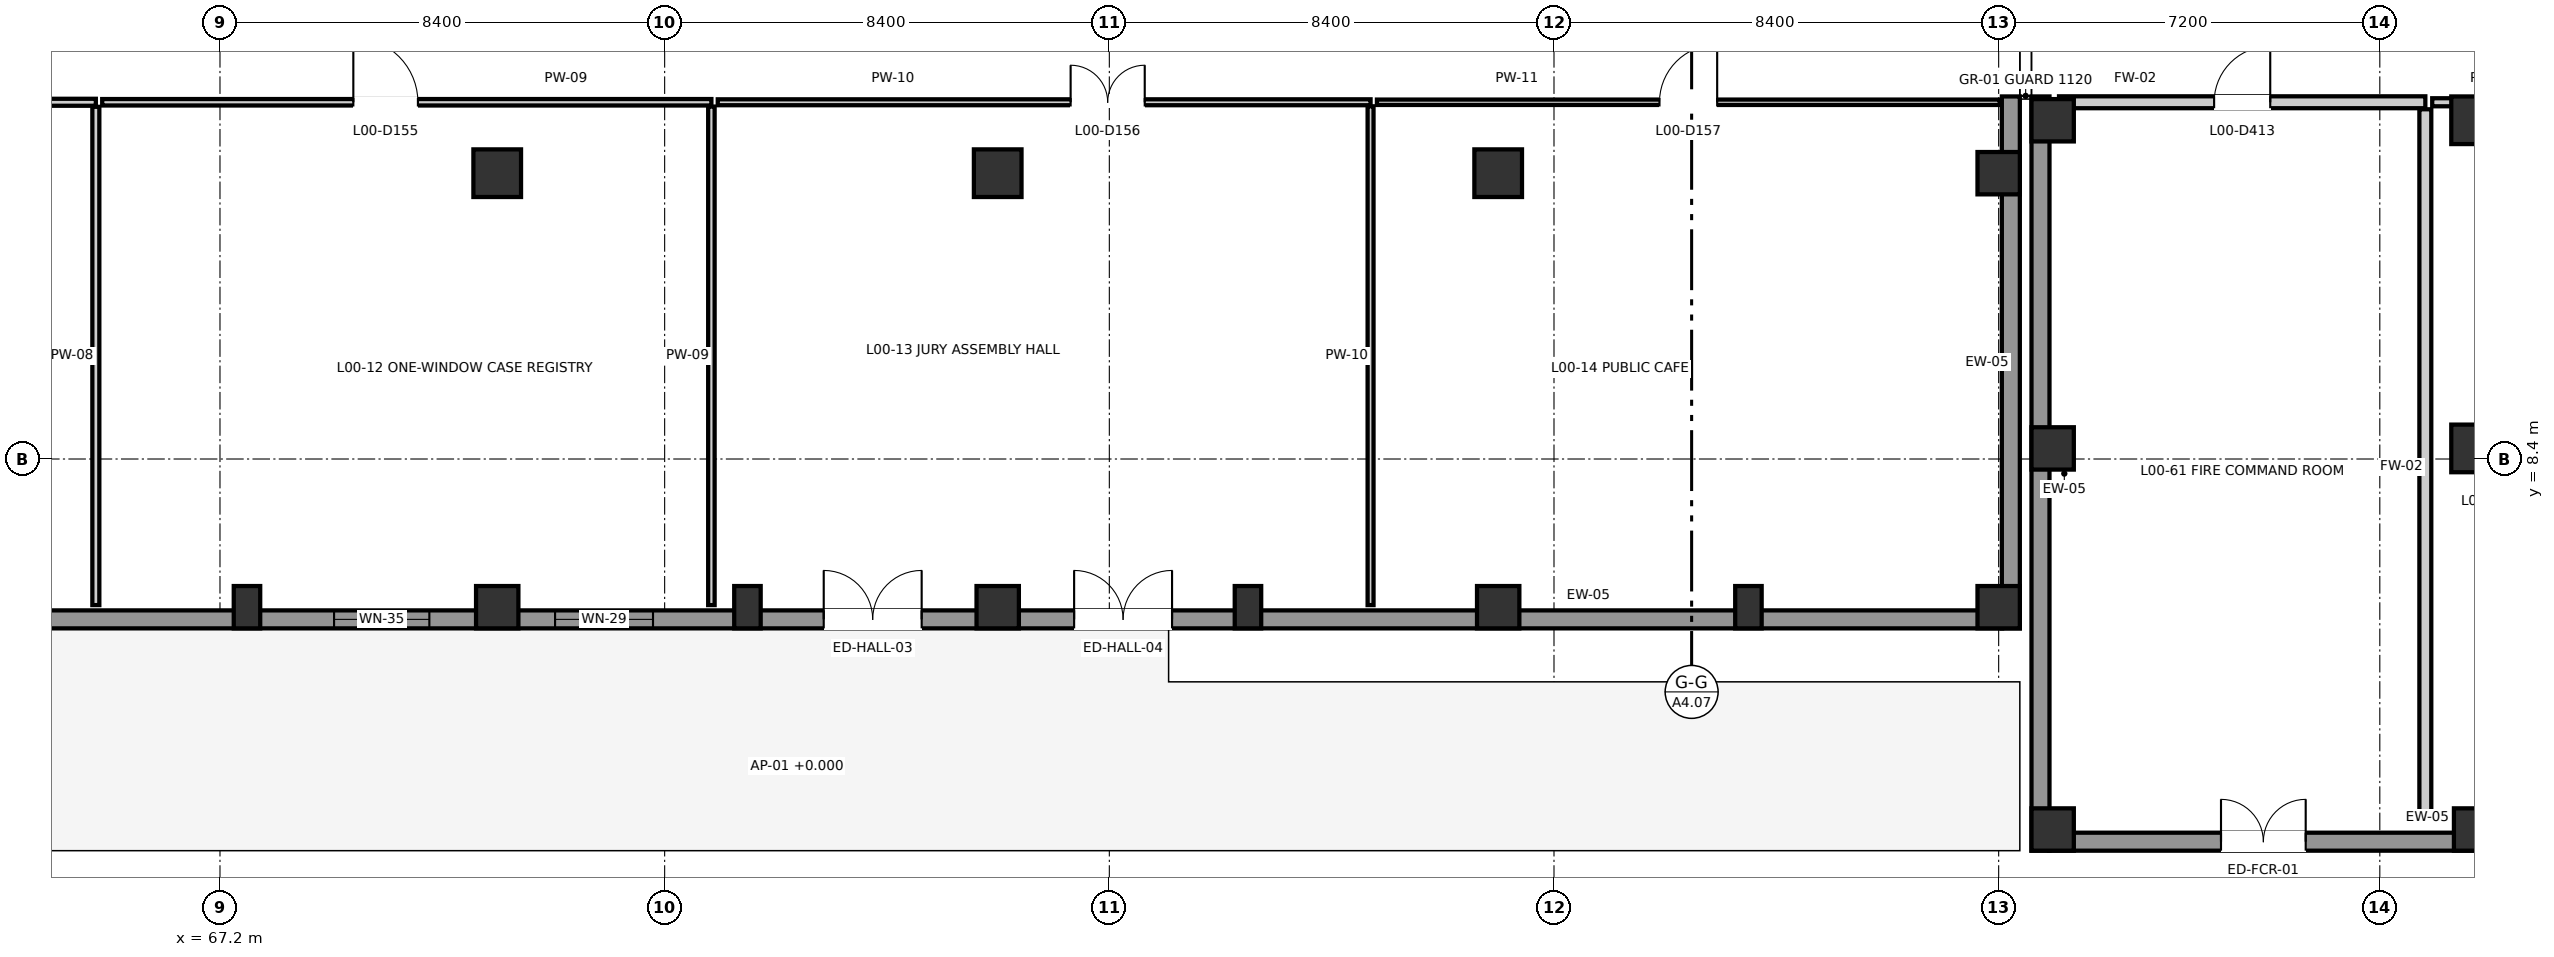
"""IFC4 building model, lengths in metres.
Left out: names, types, materials, properties, quantities, classifications, styles, units other than length and angle.
Written with IfcOpenShell. Run it as: python <this file> out.ifc"""

import sys

from ifc_helpers import new_model, si_unit, direction, frame, frame_2d, origin, origin_2d, place, context, subcontext, project, spatial, rectangle, extrude, element, fill, save


model = new_model("IFC4")
c1 = context("Model", 3, precision=1e-05, world=origin(), true_north=direction((0.0, 1.0)))
c2 = subcontext(c1, "Body", "Model", "MODEL_VIEW")
j1 = project(units=[si_unit("LENGTHUNIT", "METRE"), si_unit("PLANEANGLEUNIT", "RADIAN")], contexts=[c1])
p1 = place(None, origin())
s1 = spatial("IfcSite", under=j1, at=p1, CompositionType="ELEMENT")
p2 = place(p1, origin())
s2 = spatial("IfcBuilding", under=s1, at=p2, CompositionType="ELEMENT")
p3 = place(p2, origin())
s3 = spatial("IfcBuildingStorey", under=s2, at=p3, CompositionType="ELEMENT", Elevation=0.0)
p4 = place(p3, frame((72.437, 5.6, 0.0), z_axis=(0.0, 0.0, 1.0), x_axis=(1.0, 0.0, 0.0)))
e1 = element("IfcColumn", 1, at=p4, inside=s3, PredefinedType="COLUMN", context=c2, shape_type="SweptSolid", body=[
    extrude(rectangle(XDim=0.8, YDim=0.8, at=origin_2d()), origin(), (0.0, 0.0, 1.0), 5.4),
])
p5 = place(p3, frame((72.437, 13.8, 0.0), z_axis=(0.0, 0.0, 1.0), x_axis=(1.0, 0.0, 0.0)))
e2 = element("IfcColumn", 2, at=p5, inside=s3, PredefinedType="COLUMN", context=c2, shape_type="SweptSolid", body=[
    extrude(rectangle(XDim=0.9, YDim=0.9, at=origin_2d()), origin(), (0.0, 0.0, 1.0), 5.4),
])
p6 = place(p3, frame((81.891, 5.6, 0.0), z_axis=(0.0, 0.0, 1.0), x_axis=(1.0, 0.0, 0.0)))
e3 = element("IfcColumn", 3, at=p6, inside=s3, PredefinedType="COLUMN", context=c2, shape_type="SweptSolid", body=[
    extrude(rectangle(XDim=0.8, YDim=0.8, at=origin_2d()), origin(), (0.0, 0.0, 1.0), 5.4),
])
p7 = place(p3, frame((81.891, 13.8, 0.0), z_axis=(0.0, 0.0, 1.0), x_axis=(1.0, 0.0, 0.0)))
e4 = element("IfcColumn", 4, at=p7, inside=s3, PredefinedType="COLUMN", context=c2, shape_type="SweptSolid", body=[
    extrude(rectangle(XDim=0.9, YDim=0.9, at=origin_2d()), origin(), (0.0, 0.0, 1.0), 5.4),
])
p8 = place(p3, frame((91.346, 5.6, 0.0), z_axis=(0.0, 0.0, 1.0), x_axis=(1.0, 0.0, 0.0)))
e5 = element("IfcColumn", 5, at=p8, inside=s3, PredefinedType="COLUMN", context=c2, shape_type="SweptSolid", body=[
    extrude(rectangle(XDim=0.8, YDim=0.8, at=origin_2d()), origin(), (0.0, 0.0, 1.0), 5.4),
])
p9 = place(p3, frame((91.346, 13.8, 0.0), z_axis=(0.0, 0.0, 1.0), x_axis=(1.0, 0.0, 0.0)))
e6 = element("IfcColumn", 6, at=p9, inside=s3, PredefinedType="COLUMN", context=c2, shape_type="SweptSolid", body=[
    extrude(rectangle(XDim=0.9, YDim=0.9, at=origin_2d()), origin(), (0.0, 0.0, 1.0), 5.4),
])
for number, where, z_axis, x_axis in (
    (7, (100.8, 5.6, 0.0), (0.0, 0.0, 1.0), (1.0, 0.0, 0.0)),
    (8, (100.8, 13.8, 0.0), (0.0, 0.0, 1.0), (1.0, 0.0, 0.0)),
    (9, (101.82, 1.4, 0.0), (0.0, 0.0, 1.0), (1.0, 0.0, 0.0)),
    (10, (101.82, 8.6, 0.0), (0.0, 0.0, 1.0), (1.0, 0.0, 0.0)),
    (11, (101.82, 14.8, 0.0), (0.0, 0.0, 1.0), (1.0, 0.0, 0.0)),
    (12, (109.8, 1.4, 0.0), (0.0, 0.0, 1.0), (1.0, 0.0, 0.0)),
):
    element("IfcColumn", number, at=place(p3, frame(where, z_axis=z_axis, x_axis=x_axis)), inside=s3, PredefinedType="COLUMN", context=c2, shape_type="SweptSolid", body=[
        extrude(rectangle(XDim=0.8, YDim=0.8, at=origin_2d()), origin(), (0.0, 0.0, 1.0), 5.4),
    ])
for number, where, z_axis, x_axis in (
    (13, (109.8, 8.6, 0.0), (0.0, 0.0, 1.0), (1.0, 0.0, 0.0)),
    (14, (109.8, 14.8, 0.0), (0.0, 0.0, 1.0), (1.0, 0.0, 0.0)),
):
    element("IfcColumn", number, at=place(p3, frame(where, z_axis=z_axis, x_axis=x_axis)), inside=s3, PredefinedType="COLUMN", context=c2, shape_type="SweptSolid", body=[
        extrude(rectangle(XDim=0.9, YDim=0.9, at=origin_2d()), origin(), (0.0, 0.0, 1.0), 5.4),
    ])
for number, where, z_axis, x_axis in (
    (15, (67.71, 5.6, 0.0), (0.0, 0.0, 1.0), (1.0, 0.0, 0.0)),
    (16, (77.164, 5.6, 0.0), (0.0, 0.0, 1.0), (1.0, 0.0, 0.0)),
    (17, (86.619, 5.6, 0.0), (0.0, 0.0, 1.0), (1.0, 0.0, 0.0)),
    (18, (96.073, 5.6, 0.0), (0.0, 0.0, 1.0), (1.0, 0.0, 0.0)),
):
    element("IfcColumn", number, at=place(p3, frame(where, z_axis=z_axis, x_axis=x_axis)), inside=s3, PredefinedType="PILASTER", context=c2, shape_type="SweptSolid", body=[
        extrude(rectangle(XDim=0.5, YDim=0.8, at=origin_2d()), origin(), (0.0, 0.0, 1.0), 5.4),
    ])
p10 = place(p3, frame((34.555, 5.37, 0.0), z_axis=(0.0, 0.0, 1.0), x_axis=(1.0, 0.0, 0.0)))
e19 = element("IfcWall", 19, at=p10, inside=s3, PredefinedType="SOLIDWALL", context=c2, shape_type="SweptSolid", body=[
    extrude(rectangle(XDim=66.31, YDim=0.34, at=frame_2d((33.155, 0.0))), origin(), (0.0, 0.0, 1.0), 5.1),
])
p11 = place(p10, frame((15.68, 0.0, 0.0)))
e20 = element("IfcOpeningElement", 20, at=p11, cuts=e19, PredefinedType="OPENING", context=c2, shape_type="SweptSolid", body=[
    extrude(rectangle(XDim=1.85, YDim=2.45, at=frame_2d((0.925, 1.225))), frame((0.0, 0.185, 0.0), z_axis=(0.0, -1.0, 0.0), x_axis=(1.0, 0.0, 0.0)), (0.0, 0.0, 1.0), 0.37),
])
p12 = place(p10, frame((20.41, 0.0, 0.0)))
e21 = element("IfcOpeningElement", 21, at=p12, cuts=e19, PredefinedType="OPENING", context=c2, shape_type="SweptSolid", body=[
    extrude(rectangle(XDim=1.85, YDim=2.45, at=frame_2d((0.925, 1.225))), frame((0.0, 0.185, 0.0), z_axis=(0.0, -1.0, 0.0), x_axis=(1.0, 0.0, 0.0)), (0.0, 0.0, 1.0), 0.37),
])
p13 = place(p10, frame((44.05, 0.0, 0.0)))
e22 = element("IfcOpeningElement", 22, at=p13, cuts=e19, PredefinedType="OPENING", context=c2, shape_type="SweptSolid", body=[
    extrude(rectangle(XDim=1.85, YDim=2.45, at=frame_2d((0.925, 1.225))), frame((0.0, 0.185, 0.0), z_axis=(0.0, -1.0, 0.0), x_axis=(1.0, 0.0, 0.0)), (0.0, 0.0, 1.0), 0.37),
])
p14 = place(p10, frame((48.78, 0.0, 0.0)))
e23 = element("IfcOpeningElement", 23, at=p14, cuts=e19, PredefinedType="OPENING", context=c2, shape_type="SweptSolid", body=[
    extrude(rectangle(XDim=1.85, YDim=2.45, at=frame_2d((0.925, 1.225))), frame((0.0, 0.185, 0.0), z_axis=(0.0, -1.0, 0.0), x_axis=(1.0, 0.0, 0.0)), (0.0, 0.0, 1.0), 0.37),
])
p15 = place(p10, frame((34.8, 0.0, 0.72)))
e24 = element("IfcOpeningElement", 24, at=p15, cuts=e19, PredefinedType="OPENING", context=c2, shape_type="SweptSolid", body=[
    extrude(rectangle(XDim=1.8, YDim=2.35, at=frame_2d((0.9, 1.175))), frame((0.0, 0.185, 0.0), z_axis=(0.0, -1.0, 0.0), x_axis=(1.0, 0.0, 0.0)), (0.0, 0.0, 1.0), 0.37),
])
p16 = place(p10, frame((38.975, 0.0, 0.72)))
e25 = element("IfcOpeningElement", 25, at=p16, cuts=e19, PredefinedType="OPENING", context=c2, shape_type="SweptSolid", body=[
    extrude(rectangle(XDim=1.85, YDim=2.15, at=frame_2d((0.925, 1.075))), frame((0.0, 0.185, 0.0), z_axis=(0.0, -1.0, 0.0), x_axis=(1.0, 0.0, 0.0)), (0.0, 0.0, 1.0), 0.37),
])
p17 = place(p3, frame((101.03, 5.2, 0.0), z_axis=(0.0, 0.0, 1.0), x_axis=(0.0, 1.0, 0.0)))
e26 = element("IfcWall", 26, at=p17, inside=s3, PredefinedType="SOLIDWALL", context=c2, shape_type="SweptSolid", body=[
    extrude(rectangle(XDim=10.05, YDim=0.34, at=frame_2d((5.025, 0.0))), origin(), (0.0, 0.0, 1.0), 5.1),
])
p18 = place(p3, frame((101.755, 1.17, 0.0), z_axis=(0.0, 0.0, 1.0), x_axis=(1.0, 0.0, 0.0)))
e27 = element("IfcWall", 27, at=p18, inside=s3, PredefinedType="SOLIDWALL", context=c2, shape_type="SweptSolid", body=[
    extrude(rectangle(XDim=63.91, YDim=0.34, at=frame_2d((31.955, 0.0))), origin(), (0.0, 0.0, 1.0), 5.1),
])
p19 = place(p18, frame((3.245, 0.0, 0.0)))
e28 = element("IfcOpeningElement", 28, at=p19, cuts=e27, PredefinedType="OPENING", context=c2, shape_type="SweptSolid", body=[
    extrude(rectangle(XDim=1.6, YDim=2.26, at=frame_2d((0.8, 1.13))), frame((0.0, 0.185, 0.0), z_axis=(0.0, -1.0, 0.0), x_axis=(1.0, 0.0, 0.0)), (0.0, 0.0, 1.0), 0.37),
])
p20 = place(p18, frame((9.445, 0.0, 0.0)))
e29 = element("IfcOpeningElement", 29, at=p20, cuts=e27, PredefinedType="OPENING", context=c2, shape_type="SweptSolid", body=[
    extrude(rectangle(XDim=1.8, YDim=2.38, at=frame_2d((0.9, 1.19))), frame((0.0, 0.185, 0.0), z_axis=(0.0, -1.0, 0.0), x_axis=(1.0, 0.0, 0.0)), (0.0, 0.0, 1.0), 0.37),
])
p21 = place(p18, frame((13.695, 0.0, 0.0)))
e30 = element("IfcOpeningElement", 30, at=p21, cuts=e27, PredefinedType="OPENING", context=c2, shape_type="SweptSolid", body=[
    extrude(rectangle(XDim=1.2, YDim=2.2, at=frame_2d((0.6, 1.1))), frame((0.0, 0.185, 0.0), z_axis=(0.0, -1.0, 0.0), x_axis=(1.0, 0.0, 0.0)), (0.0, 0.0, 1.0), 0.37),
])
p22 = place(p18, frame((27.845, 0.0, 0.0)))
e31 = element("IfcOpeningElement", 31, at=p22, cuts=e27, PredefinedType="OPENING", context=c2, shape_type="SweptSolid", body=[
    extrude(rectangle(XDim=1.8, YDim=2.38, at=frame_2d((0.9, 1.19))), frame((0.0, 0.185, 0.0), z_axis=(0.0, -1.0, 0.0), x_axis=(1.0, 0.0, 0.0)), (0.0, 0.0, 1.0), 0.37),
])
p23 = place(p3, frame((101.59, 15.25, 0.0), z_axis=(0.0, 0.0, 1.0), x_axis=(0.0, -1.0, 0.0)))
e32 = element("IfcWall", 32, at=p23, inside=s3, PredefinedType="SOLIDWALL", context=c2, shape_type="SweptSolid", body=[
    extrude(rectangle(XDim=14.25, YDim=0.34, at=frame_2d((7.125, 0.0))), origin(), (0.0, 0.0, 1.0), 5.1),
])
p24 = place(p3, frame((52.54, 15.14, 0.0), z_axis=(0.0, 0.0, 1.0), x_axis=(1.0, 0.0, 0.0)))
e33 = element("IfcWall", 33, at=p24, inside=s3, PredefinedType="PARTITIONING", context=c2, shape_type="SweptSolid", body=[
    extrude(rectangle(XDim=12.315, YDim=0.132, at=frame_2d((6.157, 0.0))), origin(), (0.0, 0.0, 1.0), 5.1),
])
p25 = place(p24, frame((5.407, 0.0, 0.0)))
e34 = element("IfcOpeningElement", 34, at=p25, cuts=e33, PredefinedType="OPENING", context=c2, shape_type="SweptSolid", body=[
    extrude(rectangle(XDim=1.5, YDim=2.25, at=frame_2d((0.75, 1.125))), frame((0.0, 0.081, 0.0), z_axis=(0.0, -1.0, 0.0), x_axis=(1.0, 0.0, 0.0)), (0.0, 0.0, 1.0), 0.162),
])
p26 = place(p3, frame((64.855, 5.64, 0.0), z_axis=(0.0, 0.0, 1.0), x_axis=(0.0, 1.0, 0.0)))
e35 = element("IfcWall", 35, at=p26, inside=s3, PredefinedType="PARTITIONING", context=c2, shape_type="SweptSolid", body=[
    extrude(rectangle(XDim=9.414, YDim=0.132, at=frame_2d((4.707, 0.0))), origin(), (0.0, 0.0, 1.0), 5.1),
])
p27 = place(p3, frame((64.975, 15.14, 0.0), z_axis=(0.0, 0.0, 1.0), x_axis=(1.0, 0.0, 0.0)))
e36 = element("IfcWall", 36, at=p27, inside=s3, PredefinedType="PARTITIONING", context=c2, shape_type="SweptSolid", body=[
    extrude(rectangle(XDim=11.508, YDim=0.122, at=frame_2d((5.754, 0.0))), origin(), (0.0, 0.0, 1.0), 5.1),
])
p28 = place(p27, frame((4.744, 0.0, 0.0)))
e37 = element("IfcOpeningElement", 37, at=p28, cuts=e36, PredefinedType="OPENING", context=c2, shape_type="SweptSolid", body=[
    extrude(rectangle(XDim=1.22, YDim=2.18, at=frame_2d((0.61, 1.09))), frame((0.0, 0.076, 0.0), z_axis=(0.0, -1.0, 0.0), x_axis=(1.0, 0.0, 0.0)), (0.0, 0.0, 1.0), 0.152),
])
p29 = place(p3, frame((76.483, 5.64, 0.0), z_axis=(0.0, 0.0, 1.0), x_axis=(0.0, 1.0, 0.0)))
e38 = element("IfcWall", 38, at=p29, inside=s3, PredefinedType="PARTITIONING", context=c2, shape_type="SweptSolid", body=[
    extrude(rectangle(XDim=9.419, YDim=0.122, at=frame_2d((4.709, 0.0))), origin(), (0.0, 0.0, 1.0), 5.1),
])
p30 = place(p3, frame((76.603, 15.14, 0.0), z_axis=(0.0, 0.0, 1.0), x_axis=(1.0, 0.0, 0.0)))
e39 = element("IfcWall", 39, at=p30, inside=s3, PredefinedType="PARTITIONING", context=c2, shape_type="SweptSolid", body=[
    extrude(rectangle(XDim=12.332, YDim=0.112, at=frame_2d((6.166, 0.0))), origin(), (0.0, 0.0, 1.0), 5.1),
])
p31 = place(p30, frame((6.666, 0.0, 0.0)))
e40 = element("IfcOpeningElement", 40, at=p31, cuts=e39, PredefinedType="OPENING", context=c2, shape_type="SweptSolid", body=[
    extrude(rectangle(XDim=1.4, YDim=2.2, at=frame_2d((0.7, 1.1))), frame((0.0, 0.071, 0.0), z_axis=(0.0, -1.0, 0.0), x_axis=(1.0, 0.0, 0.0)), (0.0, 0.0, 1.0), 0.142),
])
p32 = place(p3, frame((88.935, 5.64, 0.0), z_axis=(0.0, 0.0, 1.0), x_axis=(0.0, 1.0, 0.0)))
e41 = element("IfcWall", 41, at=p32, inside=s3, PredefinedType="PARTITIONING", context=c2, shape_type="SweptSolid", body=[
    extrude(rectangle(XDim=9.424, YDim=0.112, at=frame_2d((4.712, 0.0))), origin(), (0.0, 0.0, 1.0), 5.1),
])
p33 = place(p3, frame((89.055, 15.14, 0.0), z_axis=(0.0, 0.0, 1.0), x_axis=(1.0, 0.0, 0.0)))
e42 = element("IfcWall", 42, at=p33, inside=s3, PredefinedType="PARTITIONING", context=c2, shape_type="SweptSolid", body=[
    extrude(rectangle(XDim=11.765, YDim=0.102, at=frame_2d((5.883, 0.0))), origin(), (0.0, 0.0, 1.0), 5.1),
])
p34 = place(p33, frame((5.337, 0.0, 0.0)))
e43 = element("IfcOpeningElement", 43, at=p34, cuts=e42, PredefinedType="OPENING", context=c2, shape_type="SweptSolid", body=[
    extrude(rectangle(XDim=1.09, YDim=2.13, at=frame_2d((0.545, 1.065))), frame((0.0, 0.066, 0.0), z_axis=(0.0, -1.0, 0.0), x_axis=(1.0, 0.0, 0.0)), (0.0, 0.0, 1.0), 0.132),
])
p35 = place(p3, frame((101.94, 15.14, 0.0), z_axis=(0.0, 0.0, 1.0), x_axis=(1.0, 0.0, 0.0)))
e44 = element("IfcWall", 44, at=p35, inside=s3, PredefinedType="PARTITIONING", context=c2, shape_type="SweptSolid", body=[
    extrude(rectangle(XDim=6.92, YDim=0.225, at=frame_2d((3.46, 0.0))), origin(), (0.0, 0.0, 1.0), 4.59),
])
p36 = place(p35, frame((2.93, 0.0, 0.0)))
e45 = element("IfcOpeningElement", 45, at=p36, cuts=e44, PredefinedType="OPENING", context=c2, shape_type="SweptSolid", body=[
    extrude(rectangle(XDim=1.06, YDim=2.12, at=frame_2d((0.53, 1.06))), frame((0.0, 0.127, 0.0), z_axis=(0.0, -1.0, 0.0), x_axis=(1.0, 0.0, 0.0)), (0.0, 0.0, 1.0), 0.255),
])
p37 = place(p3, frame((108.86, 1.5, 0.0), z_axis=(0.0, 0.0, 1.0), x_axis=(0.0, 1.0, 0.0)))
e46 = element("IfcWall", 46, at=p37, inside=s3, PredefinedType="PARTITIONING", context=c2, shape_type="SweptSolid", body=[
    extrude(rectangle(XDim=13.508, YDim=0.225, at=frame_2d((6.754, 0.0))), origin(), (0.0, 0.0, 1.0), 5.1),
])
p38 = place(p3, frame((108.99, 15.14, 0.0), z_axis=(0.0, 0.0, 1.0), x_axis=(1.0, 0.0, 0.0)))
e47 = element("IfcWall", 47, at=p38, inside=s3, PredefinedType="PARTITIONING", context=c2, shape_type="SweptSolid", body=[
    extrude(rectangle(XDim=5.67, YDim=0.152, at=frame_2d((2.835, 0.0))), origin(), (0.0, 0.0, 1.0), 4.48),
])
p39 = place(p38, frame((2.29, 0.0, 0.0)))
e48 = element("IfcOpeningElement", 48, at=p39, cuts=e47, PredefinedType="OPENING", context=c2, shape_type="SweptSolid", body=[
    extrude(rectangle(XDim=1.09, YDim=2.13, at=frame_2d((0.545, 1.065))), frame((0.0, 0.091, 0.0), z_axis=(0.0, -1.0, 0.0), x_axis=(1.0, 0.0, 0.0)), (0.0, 0.0, 1.0), 0.182),
])
p40 = place(p13, frame((1.85, 0.0, 0.0), z_axis=(0.0, 0.0, 1.0), x_axis=(-1.0, 0.0, 0.0)))
e49 = element("IfcDoor", 49, at=p40, inside=s3, OperationType="DOUBLE_DOOR_SINGLE_SWING", PredefinedType="DOOR", context=c2, shape_type="SweptSolid", body=[
    extrude(rectangle(XDim=1.85, YDim=2.45, at=frame_2d((0.925, 1.225))), frame((0.0, 0.025, 0.0), z_axis=(0.0, -1.0, 0.0), x_axis=(1.0, 0.0, 0.0)), (0.0, 0.0, 1.0), 0.05),
])
fill(e22, e49)
p41 = place(p14, frame((1.85, 0.0, 0.0), z_axis=(0.0, 0.0, 1.0), x_axis=(-1.0, 0.0, 0.0)))
e50 = element("IfcDoor", 50, at=p41, inside=s3, OperationType="DOUBLE_DOOR_SINGLE_SWING", PredefinedType="DOOR", context=c2, shape_type="SweptSolid", body=[
    extrude(rectangle(XDim=1.85, YDim=2.45, at=frame_2d((0.925, 1.225))), frame((0.0, 0.025, 0.0), z_axis=(0.0, -1.0, 0.0), x_axis=(1.0, 0.0, 0.0)), (0.0, 0.0, 1.0), 0.05),
])
fill(e23, e50)
p42 = place(p15, origin())
e51 = element("IfcWindow", 51, at=p42, inside=s3, PartitioningType="SINGLE_PANEL", PredefinedType="WINDOW", context=c2, shape_type="SweptSolid", body=[
    extrude(rectangle(XDim=1.8, YDim=2.35, at=frame_2d((0.9, 1.175))), frame((0.0, 0.03, 0.0), z_axis=(0.0, -1.0, 0.0), x_axis=(1.0, 0.0, 0.0)), (0.0, 0.0, 1.0), 0.06),
])
fill(e24, e51)
p43 = place(p16, origin())
e52 = element("IfcWindow", 52, at=p43, inside=s3, PartitioningType="SINGLE_PANEL", PredefinedType="WINDOW", context=c2, shape_type="SweptSolid", body=[
    extrude(rectangle(XDim=1.85, YDim=2.15, at=frame_2d((0.925, 1.075))), frame((0.0, 0.03, 0.0), z_axis=(0.0, -1.0, 0.0), x_axis=(1.0, 0.0, 0.0)), (0.0, 0.0, 1.0), 0.06),
])
fill(e25, e52)
p44 = place(p19, frame((1.6, 0.0, 0.0), z_axis=(0.0, 0.0, 1.0), x_axis=(-1.0, 0.0, 0.0)))
e53 = element("IfcDoor", 53, at=p44, inside=s3, OperationType="DOUBLE_DOOR_SINGLE_SWING", PredefinedType="DOOR", context=c2, shape_type="SweptSolid", body=[
    extrude(rectangle(XDim=1.6, YDim=2.26, at=frame_2d((0.8, 1.13))), frame((0.0, 0.025, 0.0), z_axis=(0.0, -1.0, 0.0), x_axis=(1.0, 0.0, 0.0)), (0.0, 0.0, 1.0), 0.05),
])
fill(e28, e53)
p45 = place(p28, frame((1.22, 0.0, 0.0), z_axis=(0.0, 0.0, 1.0), x_axis=(-1.0, 0.0, 0.0)))
e54 = element("IfcDoor", 54, at=p45, inside=s3, OperationType="SINGLE_SWING_LEFT", PredefinedType="DOOR", context=c2, shape_type="SweptSolid", body=[
    extrude(rectangle(XDim=1.22, YDim=2.18, at=frame_2d((0.61, 1.09))), frame((0.0, 0.025, 0.0), z_axis=(0.0, -1.0, 0.0), x_axis=(1.0, 0.0, 0.0)), (0.0, 0.0, 1.0), 0.05),
])
fill(e37, e54)
p46 = place(p31, frame((1.4, 0.0, 0.0), z_axis=(0.0, 0.0, 1.0), x_axis=(-1.0, 0.0, 0.0)))
e55 = element("IfcDoor", 55, at=p46, inside=s3, OperationType="DOUBLE_DOOR_SINGLE_SWING", PredefinedType="DOOR", context=c2, shape_type="SweptSolid", body=[
    extrude(rectangle(XDim=1.4, YDim=2.2, at=frame_2d((0.7, 1.1))), frame((0.0, 0.025, 0.0), z_axis=(0.0, -1.0, 0.0), x_axis=(1.0, 0.0, 0.0)), (0.0, 0.0, 1.0), 0.05),
])
fill(e40, e55)
p47 = place(p34, frame((1.09, 0.0, 0.0), z_axis=(0.0, 0.0, 1.0), x_axis=(-1.0, 0.0, 0.0)))
e56 = element("IfcDoor", 56, at=p47, inside=s3, OperationType="SINGLE_SWING_RIGHT", PredefinedType="DOOR", context=c2, shape_type="SweptSolid", body=[
    extrude(rectangle(XDim=1.09, YDim=2.13, at=frame_2d((0.545, 1.065))), frame((0.0, 0.025, 0.0), z_axis=(0.0, -1.0, 0.0), x_axis=(1.0, 0.0, 0.0)), (0.0, 0.0, 1.0), 0.05),
])
fill(e43, e56)
p48 = place(p36, frame((1.06, 0.0, 0.0), z_axis=(0.0, 0.0, 1.0), x_axis=(-1.0, 0.0, 0.0)))
e57 = element("IfcDoor", 57, at=p48, inside=s3, OperationType="SINGLE_SWING_RIGHT", PredefinedType="DOOR", context=c2, shape_type="SweptSolid", body=[
    extrude(rectangle(XDim=1.06, YDim=2.12, at=frame_2d((0.53, 1.06))), frame((0.0, 0.025, 0.0), z_axis=(0.0, -1.0, 0.0), x_axis=(1.0, 0.0, 0.0)), (0.0, 0.0, 1.0), 0.05),
])
fill(e45, e57)
save(model, sys.argv[1])
